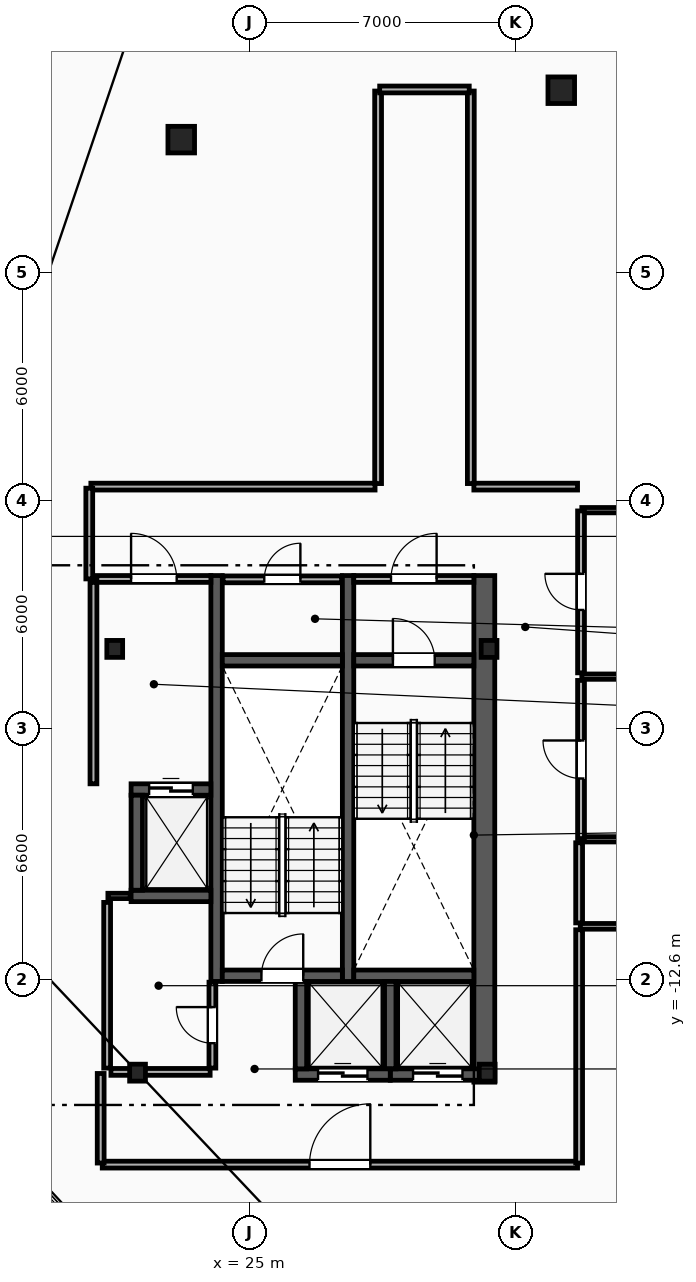
"""IFC4 building model, lengths in metres.
Left out: names, types, materials, properties, quantities, classifications, styles, units other than length and angle.
Written with IfcOpenShell. Run it as: python <this file> out.ifc"""

import sys

from ifc_helpers import new_model, si_unit, direction, frame, frame_2d, origin, origin_2d, place, context, subcontext, project, spatial, rectangle, i_section, extrude, element, fill, save


model = new_model("IFC4")
c1 = context("Model", 3, precision=1e-05, world=origin(), true_north=direction((0.0, 1.0)))
c2 = subcontext(c1, "Body", "Model", "MODEL_VIEW")
j1 = project(units=[si_unit("LENGTHUNIT", "METRE"), si_unit("PLANEANGLEUNIT", "RADIAN")], contexts=[c1])
p1 = place(None, origin())
s1 = spatial("IfcSite", under=j1, at=p1, CompositionType="ELEMENT")
p2 = place(p1, origin())
s2 = spatial("IfcBuilding", under=s1, at=p2, CompositionType="ELEMENT")
p3 = place(p2, frame((0.0, 0.0, 275.6)))
s3 = spatial("IfcBuildingStorey", under=s2, at=p3, CompositionType="ELEMENT", Elevation=275.6)
for number, where, z_axis, x_axis in (
    (1, (31.3, -3.9, 0.0), (0.0, 0.0, 1.0), (1.0, 0.0, 0.0)),
    (2, (21.45, -3.9, 0.0), (0.0, 0.0, 1.0), (1.0, 0.0, 0.0)),
    (3, (22.05, -15.05, 0.0), (0.0, 0.0, 1.0), (1.0, 0.0, 0.0)),
    (4, (31.25, -15.05, 0.0), (0.0, 0.0, 1.0), (1.0, 0.0, 0.0)),
):
    element("IfcColumn", number, at=place(p3, frame(where, z_axis=z_axis, x_axis=x_axis)), inside=s3, PredefinedType="COLUMN", context=c2, shape_type="SweptSolid", body=[
        extrude(i_section(OverallWidth=0.416, OverallDepth=0.446, WebThickness=0.039, FlangeThickness=0.063, FilletRadius=0.018, at=origin_2d()), origin(), (0.0, 0.0, 1.0), 3.6),
    ])
for number, where, z_axis, x_axis in (
    (5, (33.2, 10.8, 0.0), (0.0, 0.0, 1.0), (1.0, 0.0, 0.0)),
    (6, (23.2, 9.5, 0.0), (0.0, 0.0, 1.0), (1.0, 0.0, 0.0)),
):
    element("IfcColumn", number, at=place(p3, frame(where, z_axis=z_axis, x_axis=x_axis)), inside=s3, PredefinedType="COLUMN", context=c2, shape_type="SweptSolid", body=[
        extrude(rectangle(XDim=0.7, YDim=0.7, at=origin_2d()), origin(), (0.0, 0.0, 1.0), 3.6),
    ])
p4 = place(p3, frame((31.175, -15.3, 0.0), z_axis=(0.0, 0.0, 1.0), x_axis=(0.0, 1.0, 0.0)))
e7 = element("IfcWall", 7, at=p4, inside=s3, PredefinedType="SHEAR", context=c2, shape_type="SweptSolid", body=[
    extrude(rectangle(XDim=13.33, YDim=0.55, at=frame_2d((6.665, 0.0))), origin(), (0.0, 0.0, 1.0), 3.34),
])
for number, where, z_axis, x_axis in (
    (8, (27.59, -12.65, 0.0), (0.0, 0.0, 1.0), (0.0, 1.0, 0.0)),
    (9, (24.13, -12.65, 0.0), (0.0, 0.0, 1.0), (0.0, 1.0, 0.0)),
):
    element("IfcWall", number, at=place(p3, frame(where, z_axis=z_axis, x_axis=x_axis)), inside=s3, PredefinedType="SHEAR", context=c2, shape_type="SweptSolid", body=[
        extrude(rectangle(XDim=10.68, YDim=0.3, at=frame_2d((5.34, 0.0))), origin(), (0.0, 0.0, 1.0), 3.34),
    ])
p5 = place(p3, frame((27.74, -4.2, 0.0), z_axis=(0.0, 0.0, 1.0), x_axis=(1.0, 0.0, 0.0)))
e10 = element("IfcWall", 10, at=p5, inside=s3, PredefinedType="SHEAR", context=c2, shape_type="SweptSolid", body=[
    extrude(rectangle(XDim=3.16, YDim=0.3, at=frame_2d((1.58, 0.0))), origin(), (0.0, 0.0, 1.0), 3.34),
])
p6 = place(p5, frame((1.03, 0.0, 0.0)))
e11 = element("IfcOpeningElement", 11, at=p6, cuts=e10, PredefinedType="OPENING", context=c2, shape_type="SweptSolid", body=[
    extrude(rectangle(XDim=1.1, YDim=2.15, at=frame_2d((0.55, 1.075))), frame((0.0, 0.16, 0.0), z_axis=(0.0, -1.0, 0.0), x_axis=(1.0, 0.0, 0.0)), (0.0, 0.0, 1.0), 0.32),
])
p7 = place(p3, frame((27.74, -12.5, 0.0), z_axis=(0.0, 0.0, 1.0), x_axis=(1.0, 0.0, 0.0)))
e12 = element("IfcWall", 12, at=p7, inside=s3, PredefinedType="SHEAR", context=c2, shape_type="SweptSolid", body=[
    extrude(rectangle(XDim=3.16, YDim=0.3, at=frame_2d((1.58, 0.0))), origin(), (0.0, 0.0, 1.0), 3.34),
])
p8 = place(p3, frame((24.28, -12.5, 0.0), z_axis=(0.0, 0.0, 1.0), x_axis=(1.0, 0.0, 0.0)))
e13 = element("IfcWall", 13, at=p8, inside=s3, PredefinedType="SHEAR", context=c2, shape_type="SweptSolid", body=[
    extrude(rectangle(XDim=3.16, YDim=0.3, at=frame_2d((1.58, 0.0))), origin(), (0.0, 0.0, 1.0), 3.34),
])
p9 = place(p8, frame((1.03, 0.0, 0.0)))
e14 = element("IfcOpeningElement", 14, at=p9, cuts=e13, PredefinedType="OPENING", context=c2, shape_type="SweptSolid", body=[
    extrude(rectangle(XDim=1.1, YDim=2.15, at=frame_2d((0.55, 1.075))), frame((0.0, 0.16, 0.0), z_axis=(0.0, -1.0, 0.0), x_axis=(1.0, 0.0, 0.0)), (0.0, 0.0, 1.0), 0.32),
])
p10 = place(p3, frame((24.28, -4.2, 0.0), z_axis=(0.0, 0.0, 1.0), x_axis=(1.0, 0.0, 0.0)))
e15 = element("IfcWall", 15, at=p10, inside=s3, PredefinedType="SHEAR", context=c2, shape_type="SweptSolid", body=[
    extrude(rectangle(XDim=3.16, YDim=0.3, at=frame_2d((1.58, 0.0))), origin(), (0.0, 0.0, 1.0), 3.34),
])
p11 = place(p3, frame((20.89, -7.45, 0.0), z_axis=(0.0, 0.0, 1.0), x_axis=(0.0, 1.0, 0.0)))
e16 = element("IfcWall", 16, at=p11, inside=s3, PredefinedType="PARTITIONING", context=c2, shape_type="SweptSolid", body=[
    extrude(rectangle(XDim=5.3, YDim=0.18, at=frame_2d((2.65, 0.0))), origin(), (0.0, 0.0, 1.0), 3.34),
])
p12 = place(p3, frame((20.98, -2.06, 0.0), z_axis=(0.0, 0.0, 1.0), x_axis=(1.0, 0.0, 0.0)))
e17 = element("IfcWall", 17, at=p12, inside=s3, PredefinedType="PARTITIONING", context=c2, shape_type="SweptSolid", body=[
    extrude(rectangle(XDim=3.0, YDim=0.18, at=frame_2d((1.5, 0.0))), origin(), (0.0, 0.0, 1.0), 3.34),
])
p13 = place(p12, frame((0.9, 0.0, 0.0)))
e18 = element("IfcOpeningElement", 18, at=p13, cuts=e17, PredefinedType="OPENING", context=c2, shape_type="SweptSolid", body=[
    extrude(rectangle(XDim=1.2, YDim=2.15, at=frame_2d((0.6, 1.075))), frame((0.0, 0.1, 0.0), z_axis=(0.0, -1.0, 0.0), x_axis=(1.0, 0.0, 0.0)), (0.0, 0.0, 1.0), 0.2),
])
p14 = place(p3, frame((27.74, -2.06, 0.0), z_axis=(0.0, 0.0, 1.0), x_axis=(1.0, 0.0, 0.0)))
e19 = element("IfcWall", 19, at=p14, inside=s3, PredefinedType="PARTITIONING", context=c2, shape_type="SweptSolid", body=[
    extrude(rectangle(XDim=3.16, YDim=0.18, at=frame_2d((1.58, 0.0))), origin(), (0.0, 0.0, 1.0), 3.34),
])
p15 = place(p14, frame((0.98, 0.0, 0.0)))
e20 = element("IfcOpeningElement", 20, at=p15, cuts=e19, PredefinedType="OPENING", context=c2, shape_type="SweptSolid", body=[
    extrude(rectangle(XDim=1.2, YDim=2.15, at=frame_2d((0.6, 1.075))), frame((0.0, 0.1, 0.0), z_axis=(0.0, -1.0, 0.0), x_axis=(1.0, 0.0, 0.0)), (0.0, 0.0, 1.0), 0.2),
])
p16 = place(p3, frame((21.88, -7.6, 0.0), z_axis=(0.0, 0.0, 1.0), x_axis=(1.0, 0.0, 0.0)))
e21 = element("IfcWall", 21, at=p16, inside=s3, PredefinedType="SHEAR", context=c2, shape_type="SweptSolid", body=[
    extrude(rectangle(XDim=2.1, YDim=0.3, at=frame_2d((1.05, 0.0))), origin(), (0.0, 0.0, 1.0), 3.34),
])
p17 = place(p16, frame((0.475, 0.0, 0.0)))
e22 = element("IfcOpeningElement", 22, at=p17, cuts=e21, PredefinedType="OPENING", context=c2, shape_type="SweptSolid", body=[
    extrude(rectangle(XDim=1.15, YDim=2.2, at=frame_2d((0.575, 1.1))), frame((0.0, 0.16, 0.0), z_axis=(0.0, -1.0, 0.0), x_axis=(1.0, 0.0, 0.0)), (0.0, 0.0, 1.0), 0.32),
])
p18 = place(p3, frame((21.88, -10.4, 0.0), z_axis=(0.0, 0.0, 1.0), x_axis=(1.0, 0.0, 0.0)))
e23 = element("IfcWall", 23, at=p18, inside=s3, PredefinedType="SHEAR", context=c2, shape_type="SweptSolid", body=[
    extrude(rectangle(XDim=2.1, YDim=0.3, at=frame_2d((1.05, 0.0))), origin(), (0.0, 0.0, 1.0), 3.34),
])
p19 = place(p3, frame((22.03, -10.25, 0.0), z_axis=(0.0, 0.0, 1.0), x_axis=(0.0, 1.0, 0.0)))
e24 = element("IfcWall", 24, at=p19, inside=s3, PredefinedType="SHEAR", context=c2, shape_type="SweptSolid", body=[
    extrude(rectangle(XDim=2.5, YDim=0.3, at=frame_2d((1.25, 0.0))), origin(), (0.0, 0.0, 1.0), 3.34),
])
p20 = place(p3, frame((28.7, -15.1, 0.0), z_axis=(0.0, 0.0, 1.0), x_axis=(1.0, 0.0, 0.0)))
e25 = element("IfcWall", 25, at=p20, inside=s3, PredefinedType="SHEAR", context=c2, shape_type="SweptSolid", body=[
    extrude(rectangle(XDim=2.5, YDim=0.3, at=frame_2d((1.25, 0.0))), origin(), (0.0, 0.0, 1.0), 3.34),
])
p21 = place(p20, frame((0.6, 0.0, 0.0)))
e26 = element("IfcOpeningElement", 26, at=p21, cuts=e25, PredefinedType="OPENING", context=c2, shape_type="SweptSolid", body=[
    extrude(rectangle(XDim=1.3, YDim=2.2, at=frame_2d((0.65, 1.1))), frame((0.0, 0.16, 0.0), z_axis=(0.0, -1.0, 0.0), x_axis=(1.0, 0.0, 0.0)), (0.0, 0.0, 1.0), 0.32),
])
p22 = place(p3, frame((28.7, -14.95, 0.0), z_axis=(0.0, 0.0, 1.0), x_axis=(0.0, 1.0, 0.0)))
e27 = element("IfcWall", 27, at=p22, inside=s3, PredefinedType="SHEAR", context=c2, shape_type="SweptSolid", body=[
    extrude(rectangle(XDim=2.3, YDim=0.3, at=frame_2d((1.15, 0.0))), origin(), (0.0, 0.0, 1.0), 3.34),
])
p23 = place(p3, frame((26.2, -15.1, 0.0), z_axis=(0.0, 0.0, 1.0), x_axis=(1.0, 0.0, 0.0)))
e28 = element("IfcWall", 28, at=p23, inside=s3, PredefinedType="SHEAR", context=c2, shape_type="SweptSolid", body=[
    extrude(rectangle(XDim=2.5, YDim=0.3, at=frame_2d((1.25, 0.0))), origin(), (0.0, 0.0, 1.0), 3.34),
])
p24 = place(p23, frame((0.6, 0.0, 0.0)))
e29 = element("IfcOpeningElement", 29, at=p24, cuts=e28, PredefinedType="OPENING", context=c2, shape_type="SweptSolid", body=[
    extrude(rectangle(XDim=1.3, YDim=2.2, at=frame_2d((0.65, 1.1))), frame((0.0, 0.16, 0.0), z_axis=(0.0, -1.0, 0.0), x_axis=(1.0, 0.0, 0.0)), (0.0, 0.0, 1.0), 0.32),
])
p25 = place(p3, frame((26.35, -14.95, 0.0), z_axis=(0.0, 0.0, 1.0), x_axis=(0.0, 1.0, 0.0)))
e30 = element("IfcWall", 30, at=p25, inside=s3, PredefinedType="SHEAR", context=c2, shape_type="SweptSolid", body=[
    extrude(rectangle(XDim=2.3, YDim=0.3, at=frame_2d((1.15, 0.0))), origin(), (0.0, 0.0, 1.0), 3.34),
])
p26 = place(p3, frame((21.27, -10.4, 0.0), z_axis=(0.0, 0.0, 1.0), x_axis=(1.0, 0.0, 0.0)))
e31 = element("IfcWall", 31, at=p26, inside=s3, PredefinedType="PARTITIONING", context=c2, shape_type="SweptSolid", body=[
    extrude(rectangle(XDim=0.59, YDim=0.14, at=frame_2d((0.295, 0.0))), origin(), (0.0, 0.0, 1.0), 3.34),
])
p27 = place(p3, frame((21.25, -14.93, 0.0), z_axis=(0.0, 0.0, 1.0), x_axis=(0.0, 1.0, 0.0)))
e32 = element("IfcWall", 32, at=p27, inside=s3, PredefinedType="PARTITIONING", context=c2, shape_type="SweptSolid", body=[
    extrude(rectangle(XDim=4.36, YDim=0.18, at=frame_2d((2.18, 0.0))), origin(), (0.0, 0.0, 1.0), 3.34),
])
p28 = place(p3, frame((21.35, -15.03, 0.0), z_axis=(0.0, 0.0, 1.0), x_axis=(1.0, 0.0, 0.0)))
e33 = element("IfcWall", 33, at=p28, inside=s3, PredefinedType="PARTITIONING", context=c2, shape_type="SweptSolid", body=[
    extrude(rectangle(XDim=2.61, YDim=0.18, at=frame_2d((1.305, 0.0))), origin(), (0.0, 0.0, 1.0), 2.413),
])
p29 = place(p3, frame((24.3, -2.07, 0.0), z_axis=(0.0, 0.0, 1.0), x_axis=(1.0, 0.0, 0.0)))
e34 = element("IfcWall", 34, at=p29, inside=s3, PredefinedType="PARTITIONING", context=c2, shape_type="SweptSolid", body=[
    extrude(rectangle(XDim=3.12, YDim=0.18, at=frame_2d((1.56, 0.0))), origin(), (0.0, 0.0, 1.0), 3.34),
])
p30 = place(p29, frame((1.085, 0.0, 0.0)))
e35 = element("IfcOpeningElement", 35, at=p30, cuts=e34, PredefinedType="OPENING", context=c2, shape_type="SweptSolid", body=[
    extrude(rectangle(XDim=0.95, YDim=2.1, at=frame_2d((0.475, 1.05))), frame((0.0, 0.1, 0.0), z_axis=(0.0, -1.0, 0.0), x_axis=(1.0, 0.0, 0.0)), (0.0, 0.0, 1.0), 0.2),
])
p31 = place(p3, frame((24.02, -14.93, 0.0), z_axis=(0.0, 0.0, 1.0), x_axis=(0.0, 1.0, 0.0)))
e36 = element("IfcWall", 36, at=p31, inside=s3, PredefinedType="PARTITIONING", context=c2, shape_type="SweptSolid", body=[
    extrude(rectangle(XDim=2.26, YDim=0.18, at=frame_2d((1.13, 0.0))), origin(), (0.0, 0.0, 1.0), 3.34),
])
p32 = place(p31, frame((0.655, 0.0, 0.0)))
e37 = element("IfcOpeningElement", 37, at=p32, cuts=e36, PredefinedType="OPENING", context=c2, shape_type="SweptSolid", body=[
    extrude(rectangle(XDim=0.95, YDim=2.1, at=frame_2d((0.475, 1.05))), frame((0.0, 0.1, 0.0), z_axis=(0.0, -1.0, 0.0), x_axis=(1.0, 0.0, 0.0)), (0.0, 0.0, 1.0), 0.2),
])
for number, where, z_axis, x_axis in (
    (38, (33.74, -0.25, 0.0), (0.0, 0.0, 1.0), (1.0, 0.0, 0.0)),
    (39, (33.74, -4.63, 0.0), (0.0, 0.0, 1.0), (1.0, 0.0, 0.0)),
    (40, (33.74, -8.91, 0.0), (0.0, 0.0, 1.0), (1.0, 0.0, 0.0)),
):
    element("IfcWall", number, at=place(p3, frame(where, z_axis=z_axis, x_axis=x_axis)), inside=s3, PredefinedType="PARTITIONING", context=c2, shape_type="SweptSolid", body=[
        extrude(rectangle(XDim=4.48, YDim=0.14, at=frame_2d((2.24, 0.0))), origin(), (0.0, 0.0, 1.0), 3.34),
    ])
p33 = place(p3, frame((33.72, -4.53, 0.0), z_axis=(0.0, 0.0, 1.0), x_axis=(0.0, 1.0, 0.0)))
e41 = element("IfcWall", 41, at=p33, inside=s3, PredefinedType="PARTITIONING", context=c2, shape_type="SweptSolid", body=[
    extrude(rectangle(XDim=4.26, YDim=0.18, at=frame_2d((2.13, 0.0))), origin(), (0.0, 0.0, 1.0), 3.34),
])
p34 = place(p33, frame((1.655, 0.0, 0.0)))
e42 = element("IfcOpeningElement", 42, at=p34, cuts=e41, PredefinedType="OPENING", context=c2, shape_type="SweptSolid", body=[
    extrude(rectangle(XDim=0.95, YDim=2.1, at=frame_2d((0.475, 1.05))), frame((0.0, 0.1, 0.0), z_axis=(0.0, -1.0, 0.0), x_axis=(1.0, 0.0, 0.0)), (0.0, 0.0, 1.0), 0.2),
])
p35 = place(p3, frame((33.72, -8.89, 0.0), z_axis=(0.0, 0.0, 1.0), x_axis=(0.0, 1.0, 0.0)))
e43 = element("IfcWall", 43, at=p35, inside=s3, PredefinedType="PARTITIONING", context=c2, shape_type="SweptSolid", body=[
    extrude(rectangle(XDim=4.16, YDim=0.18, at=frame_2d((2.08, 0.0))), origin(), (0.0, 0.0, 1.0), 3.34),
])
p36 = place(p35, frame((1.58, 0.0, 0.0)))
e44 = element("IfcOpeningElement", 44, at=p36, cuts=e43, PredefinedType="OPENING", context=c2, shape_type="SweptSolid", body=[
    extrude(rectangle(XDim=1.0, YDim=2.15, at=frame_2d((0.5, 1.075))), frame((0.0, 0.1, 0.0), z_axis=(0.0, -1.0, 0.0), x_axis=(1.0, 0.0, 0.0)), (0.0, 0.0, 1.0), 0.2),
])
p37 = place(p3, frame((33.7, -11.2, 0.0), z_axis=(0.0, 0.0, 1.0), x_axis=(1.0, 0.0, 0.0)))
e45 = element("IfcWall", 45, at=p37, inside=s3, PredefinedType="PARTITIONING", context=c2, shape_type="SweptSolid", body=[
    extrude(rectangle(XDim=14.358, YDim=0.15, at=frame_2d((7.179, 0.0))), origin(), (0.0, 0.0, 1.0), 3.34),
])
p38 = place(p3, frame((21.122, -17.47, 0.0), z_axis=(0.0, 0.0, 1.0), x_axis=(1.0, 0.0, 0.0)))
e46 = element("IfcWall", 46, at=p38, inside=s3, PredefinedType="PARTITIONING", context=c2, shape_type="SweptSolid", body=[
    extrude(rectangle(XDim=12.507, YDim=0.18, at=frame_2d((6.253, 0.0))), origin(), (0.0, 0.0, 1.0), 3.34),
])
p39 = place(p38, frame((5.454, 0.0, 0.0)))
e47 = element("IfcOpeningElement", 47, at=p39, cuts=e46, PredefinedType="OPENING", context=c2, shape_type="SweptSolid", body=[
    extrude(rectangle(XDim=1.6, YDim=2.2, at=frame_2d((0.8, 1.1))), frame((0.0, 0.1, 0.0), z_axis=(0.0, -1.0, 0.0), x_axis=(1.0, 0.0, 0.0)), (0.0, 0.0, 1.0), 0.2),
])
for number, where, z_axis, x_axis in (
    (48, (30.82, 0.45, 0.0), (0.0, 0.0, 1.0), (0.0, 1.0, 0.0)),
    (49, (28.38, 10.779, 0.0), (0.0, 0.0, 1.0), (0.0, -1.0, 0.0)),
):
    element("IfcWall", number, at=place(p3, frame(where, z_axis=z_axis, x_axis=x_axis)), inside=s3, PredefinedType="PARTITIONING", context=c2, shape_type="SweptSolid", body=[
        extrude(rectangle(XDim=10.329, YDim=0.18, at=frame_2d((5.164, 0.0))), origin(), (0.0, 0.0, 1.0), 3.34),
    ])
p40 = place(p3, frame((28.3, 0.37, 0.0), z_axis=(0.0, 0.0, 1.0), x_axis=(-1.0, 0.0, 0.0)))
e50 = element("IfcWall", 50, at=p40, inside=s3, PredefinedType="PARTITIONING", context=c2, shape_type="SweptSolid", body=[
    extrude(rectangle(XDim=7.479, YDim=0.18, at=frame_2d((3.739, 0.0))), origin(), (0.0, 0.0, 1.0), 3.34),
])
p41 = place(p3, frame((33.67, -17.428, 0.0), z_axis=(0.0, 0.0, 1.0), x_axis=(0.0, 1.0, 0.0)))
e51 = element("IfcWall", 51, at=p41, inside=s3, PredefinedType="PARTITIONING", context=c2, shape_type="SweptSolid", body=[
    extrude(rectangle(XDim=6.138, YDim=0.18, at=frame_2d((3.069, 0.0))), origin(), (0.0, 0.0, 1.0), 3.34),
])
p42 = place(p3, frame((33.628, 0.37, 0.0), z_axis=(0.0, 0.0, 1.0), x_axis=(-1.0, 0.0, 0.0)))
e52 = element("IfcWall", 52, at=p42, inside=s3, PredefinedType="PARTITIONING", context=c2, shape_type="SweptSolid", body=[
    extrude(rectangle(XDim=2.729, YDim=0.18, at=frame_2d((1.364, 0.0))), origin(), (0.0, 0.0, 1.0), 3.34),
])
p43 = place(p3, frame((20.78, 0.329, 0.0), z_axis=(0.0, 0.0, 1.0), x_axis=(0.0, -1.0, 0.0)))
e53 = element("IfcWall", 53, at=p43, inside=s3, PredefinedType="PARTITIONING", context=c2, shape_type="SweptSolid", body=[
    extrude(rectangle(XDim=2.387, YDim=0.18, at=frame_2d((1.194, 0.0))), origin(), (0.0, 0.0, 1.0), 3.34),
])
p44 = place(p3, frame((30.779, 10.82, 0.0), z_axis=(0.0, 0.0, 1.0), x_axis=(-1.0, 0.0, 0.0)))
e54 = element("IfcWall", 54, at=p44, inside=s3, PredefinedType="PARTITIONING", context=c2, shape_type="SweptSolid", body=[
    extrude(rectangle(XDim=2.357, YDim=0.18, at=frame_2d((1.179, 0.0))), origin(), (0.0, 0.0, 1.0), 3.34),
])
p45 = place(p3, frame((21.08, -15.072, 0.0), z_axis=(0.0, 0.0, 1.0), x_axis=(0.0, -1.0, 0.0)))
e55 = element("IfcWall", 55, at=p45, inside=s3, PredefinedType="PARTITIONING", context=c2, shape_type="SweptSolid", body=[
    extrude(rectangle(XDim=2.357, YDim=0.18, at=frame_2d((1.178, 0.0))), origin(), (0.0, 0.0, 1.0), 3.34),
])
p46 = place(p3, frame((33.67, -11.11, 0.0), z_axis=(0.0, 0.0, 1.0), x_axis=(0.0, 1.0, 0.0)))
e56 = element("IfcWall", 56, at=p46, inside=s3, PredefinedType="PARTITIONING", context=c2, shape_type="SweptSolid", body=[
    extrude(rectangle(XDim=2.109, YDim=0.18, at=frame_2d((1.054, 0.0))), origin(), (0.0, 0.0, 1.0), 3.34),
])
p47 = place(p6, origin())
e57 = element("IfcDoor", 57, at=p47, inside=s3, OperationType="SINGLE_SWING_LEFT", PredefinedType="DOOR", context=c2, shape_type="SweptSolid", body=[
    extrude(rectangle(XDim=1.1, YDim=2.15, at=frame_2d((0.55, 1.075))), frame((0.0, 0.025, 0.0), z_axis=(0.0, -1.0, 0.0), x_axis=(1.0, 0.0, 0.0)), (0.0, 0.0, 1.0), 0.05),
])
fill(e11, e57)
p48 = place(p9, origin())
e58 = element("IfcDoor", 58, at=p48, inside=s3, OperationType="SINGLE_SWING_RIGHT", PredefinedType="DOOR", context=c2, shape_type="SweptSolid", body=[
    extrude(rectangle(XDim=1.1, YDim=2.15, at=frame_2d((0.55, 1.075))), frame((0.0, 0.025, 0.0), z_axis=(0.0, -1.0, 0.0), x_axis=(1.0, 0.0, 0.0)), (0.0, 0.0, 1.0), 0.05),
])
fill(e14, e58)
p49 = place(p13, origin())
e59 = element("IfcDoor", 59, at=p49, inside=s3, OperationType="SINGLE_SWING_LEFT", PredefinedType="DOOR", context=c2, shape_type="SweptSolid", body=[
    extrude(rectangle(XDim=1.2, YDim=2.15, at=frame_2d((0.6, 1.075))), frame((0.0, 0.025, 0.0), z_axis=(0.0, -1.0, 0.0), x_axis=(1.0, 0.0, 0.0)), (0.0, 0.0, 1.0), 0.05),
])
fill(e18, e59)
p50 = place(p15, origin())
e60 = element("IfcDoor", 60, at=p50, inside=s3, OperationType="SINGLE_SWING_RIGHT", PredefinedType="DOOR", context=c2, shape_type="SweptSolid", body=[
    extrude(rectangle(XDim=1.2, YDim=2.15, at=frame_2d((0.6, 1.075))), frame((0.0, 0.025, 0.0), z_axis=(0.0, -1.0, 0.0), x_axis=(1.0, 0.0, 0.0)), (0.0, 0.0, 1.0), 0.05),
])
fill(e20, e60)
p51 = place(p17, origin())
e61 = element("IfcDoor", 61, at=p51, inside=s3, OperationType="SLIDING_TO_LEFT", PredefinedType="TRAPDOOR", context=c2, shape_type="SweptSolid", body=[
    extrude(rectangle(XDim=1.15, YDim=2.2, at=frame_2d((0.575, 1.1))), frame((0.0, 0.025, 0.0), z_axis=(0.0, -1.0, 0.0), x_axis=(1.0, 0.0, 0.0)), (0.0, 0.0, 1.0), 0.05),
])
fill(e22, e61)
p52 = place(p21, origin())
e62 = element("IfcDoor", 62, at=p52, inside=s3, OperationType="SLIDING_TO_LEFT", PredefinedType="TRAPDOOR", context=c2, shape_type="SweptSolid", body=[
    extrude(rectangle(XDim=1.3, YDim=2.2, at=frame_2d((0.65, 1.1))), frame((0.0, 0.025, 0.0), z_axis=(0.0, -1.0, 0.0), x_axis=(1.0, 0.0, 0.0)), (0.0, 0.0, 1.0), 0.05),
])
fill(e26, e62)
p53 = place(p24, origin())
e63 = element("IfcDoor", 63, at=p53, inside=s3, OperationType="SLIDING_TO_LEFT", PredefinedType="TRAPDOOR", context=c2, shape_type="SweptSolid", body=[
    extrude(rectangle(XDim=1.3, YDim=2.2, at=frame_2d((0.65, 1.1))), frame((0.0, 0.025, 0.0), z_axis=(0.0, -1.0, 0.0), x_axis=(1.0, 0.0, 0.0)), (0.0, 0.0, 1.0), 0.05),
])
fill(e29, e63)
p54 = place(p39, origin())
e64 = element("IfcDoor", 64, at=p54, inside=s3, OperationType="SINGLE_SWING_RIGHT", PredefinedType="DOOR", context=c2, shape_type="SweptSolid", body=[
    extrude(rectangle(XDim=1.6, YDim=2.2, at=frame_2d((0.8, 1.1))), frame((0.0, 0.025, 0.0), z_axis=(0.0, -1.0, 0.0), x_axis=(1.0, 0.0, 0.0)), (0.0, 0.0, 1.0), 0.05),
])
fill(e47, e64)
p55 = place(p34, origin())
e65 = element("IfcDoor", 65, at=p55, inside=s3, OperationType="SINGLE_SWING_RIGHT", PredefinedType="DOOR", context=c2, shape_type="SweptSolid", body=[
    extrude(rectangle(XDim=0.95, YDim=2.1, at=frame_2d((0.475, 1.05))), frame((0.0, 0.025, 0.0), z_axis=(0.0, -1.0, 0.0), x_axis=(1.0, 0.0, 0.0)), (0.0, 0.0, 1.0), 0.05),
])
fill(e42, e65)
p56 = place(p36, origin())
e66 = element("IfcDoor", 66, at=p56, inside=s3, OperationType="SINGLE_SWING_RIGHT", PredefinedType="DOOR", context=c2, shape_type="SweptSolid", body=[
    extrude(rectangle(XDim=1.0, YDim=2.15, at=frame_2d((0.5, 1.075))), frame((0.0, 0.025, 0.0), z_axis=(0.0, -1.0, 0.0), x_axis=(1.0, 0.0, 0.0)), (0.0, 0.0, 1.0), 0.05),
])
fill(e44, e66)
p57 = place(p30, origin())
e67 = element("IfcDoor", 67, at=p57, inside=s3, OperationType="SINGLE_SWING_RIGHT", PredefinedType="DOOR", context=c2, shape_type="SweptSolid", body=[
    extrude(rectangle(XDim=0.95, YDim=2.1, at=frame_2d((0.475, 1.05))), frame((0.0, 0.025, 0.0), z_axis=(0.0, -1.0, 0.0), x_axis=(1.0, 0.0, 0.0)), (0.0, 0.0, 1.0), 0.05),
])
fill(e35, e67)
p58 = place(p32, origin())
e68 = element("IfcDoor", 68, at=p58, inside=s3, OperationType="SINGLE_SWING_RIGHT", PredefinedType="DOOR", context=c2, shape_type="SweptSolid", body=[
    extrude(rectangle(XDim=0.95, YDim=2.1, at=frame_2d((0.475, 1.05))), frame((0.0, 0.025, 0.0), z_axis=(0.0, -1.0, 0.0), x_axis=(1.0, 0.0, 0.0)), (0.0, 0.0, 1.0), 0.05),
])
fill(e37, e68)
save(model, sys.argv[1])
